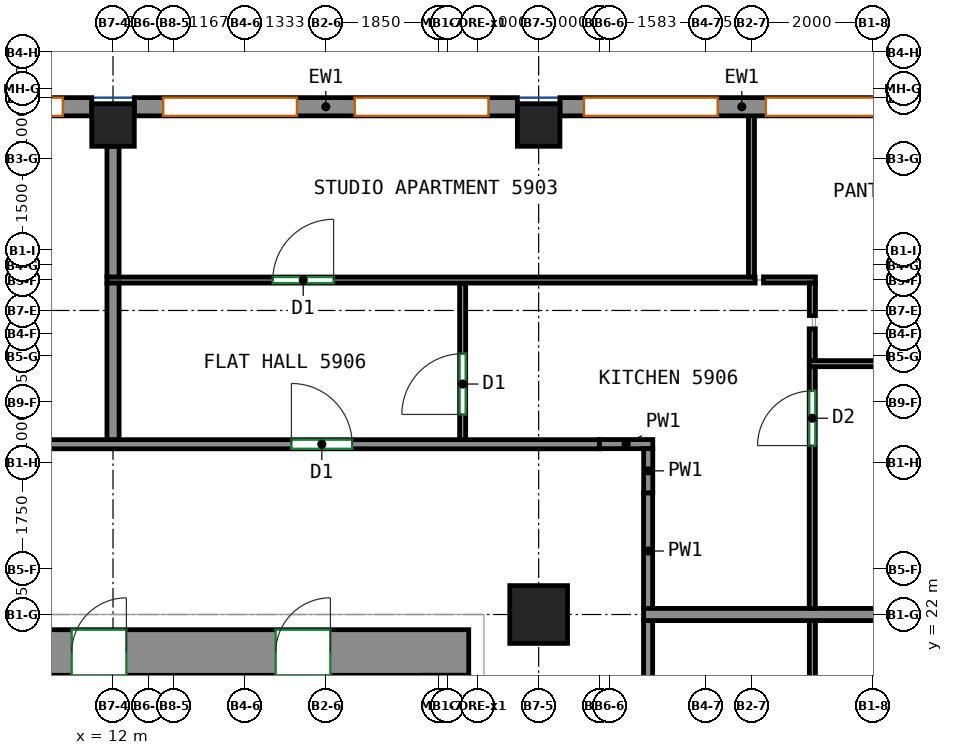
"""IFC4 building model, lengths in metres.
Left out: names, types, materials, properties, quantities, classifications, styles, units other than length and angle.
Written with IfcOpenShell. Run it as: python <this file> out.ifc"""

import sys

from ifc_helpers import new_model, si_unit, direction, frame, frame_2d, origin, origin_2d, place, context, subcontext, project, spatial, rectangle, extrude, source, transform, mapped, element, fill, save


model = new_model("IFC4")
c1 = context("Model", 3, precision=1e-05, world=origin(), true_north=direction((0.0, 1.0)))
c2 = subcontext(c1, "Body", "Model", "MODEL_VIEW")
j1 = project(units=[si_unit("LENGTHUNIT", "METRE"), si_unit("PLANEANGLEUNIT", "RADIAN")], contexts=[c1])
p1 = place(None, origin())
s1 = spatial("IfcSite", under=j1, at=p1, CompositionType="ELEMENT")
p2 = place(p1, origin())
s2 = spatial("IfcBuilding", under=s1, at=p2, CompositionType="ELEMENT")
p3 = place(p2, frame((0.0, 0.0, 245.8)))
s3 = spatial("IfcBuildingStorey", under=s2, at=p3, CompositionType="ELEMENT", Elevation=245.8)
m1 = source(origin(), c2, "Body", "SweptSolid", [
    extrude(rectangle(XDim=0.7, YDim=0.7, at=origin_2d()), origin(), (0.0, 0.0, 1.0), 3.12),
])
p4 = place(p3, frame((12.0, 30.05, 0.0), z_axis=(0.0, 0.0, 1.0), x_axis=(1.0, 0.0, 0.0)))
e1 = element("IfcColumn", 1, at=p4, inside=s3, PredefinedType="COLUMN", context=c2, shape_type="MappedRepresentation", body=[
    mapped(m1, transform((0.0, 0.0, 0.0))),
])
m2 = source(origin(), c2, "Body", "SweptSolid", [
    extrude(rectangle(XDim=0.95, YDim=0.95, at=origin_2d()), origin(), (0.0, 0.0, 1.0), 3.12),
])
p5 = place(p3, frame((19.0, 22.0, 0.0), z_axis=(0.0, 0.0, 1.0), x_axis=(1.0, 0.0, 0.0)))
e2 = element("IfcColumn", 2, at=p5, inside=s3, PredefinedType="COLUMN", context=c2, shape_type="MappedRepresentation", body=[
    mapped(m2, transform((0.0, 0.0, 0.0))),
])
p6 = place(p3, frame((19.0, 30.05, 0.0), z_axis=(0.0, 0.0, 1.0), x_axis=(1.0, 0.0, 0.0)))
e3 = element("IfcColumn", 3, at=p6, inside=s3, PredefinedType="COLUMN", context=c2, shape_type="MappedRepresentation", body=[
    mapped(m1, transform((0.0, 0.0, 0.0))),
])
m3 = source(origin(), c2, "Body", "SweptSolid", [
    extrude(rectangle(XDim=33.6, YDim=0.75, at=frame_2d((16.8, 0.0))), origin(), (0.0, 0.0, 1.0), 3.12),
])
p7 = place(p3, frame((-15.75, 21.375, 0.0), z_axis=(0.0, 0.0, 1.0), x_axis=(1.0, 0.0, 0.0)))
e4 = element("IfcWall", 4, at=p7, inside=s3, PredefinedType="SHEAR", context=c2, shape_type="MappedRepresentation", body=[
    mapped(m3, transform((0.0, 0.0, 0.0))),
])
p8 = place(p7, frame((5.858, 0.0, 0.0)))
e5 = element("IfcOpeningElement", 5, at=p8, cuts=e4, PredefinedType="OPENING", context=c2, shape_type="SweptSolid", body=[
    extrude(rectangle(XDim=0.9, YDim=2.1, at=frame_2d((0.45, 1.05))), frame((0.0, 0.385, 0.0), z_axis=(0.0, -1.0, 0.0), x_axis=(1.0, 0.0, 0.0)), (0.0, 0.0, 1.0), 0.77),
])
p9 = place(p7, frame((10.923, 0.0, 0.0)))
e6 = element("IfcOpeningElement", 6, at=p9, cuts=e4, PredefinedType="OPENING", context=c2, shape_type="SweptSolid", body=[
    extrude(rectangle(XDim=0.9, YDim=2.1, at=frame_2d((0.45, 1.05))), frame((0.0, 0.385, 0.0), z_axis=(0.0, -1.0, 0.0), x_axis=(1.0, 0.0, 0.0)), (0.0, 0.0, 1.0), 0.77),
])
p10 = place(p7, frame((15.988, 0.0, 0.0)))
e7 = element("IfcOpeningElement", 7, at=p10, cuts=e4, PredefinedType="OPENING", context=c2, shape_type="SweptSolid", body=[
    extrude(rectangle(XDim=0.9, YDim=2.1, at=frame_2d((0.45, 1.05))), frame((0.0, 0.385, 0.0), z_axis=(0.0, -1.0, 0.0), x_axis=(1.0, 0.0, 0.0)), (0.0, 0.0, 1.0), 0.77),
])
p11 = place(p7, frame((21.643, 0.0, 0.0)))
e8 = element("IfcOpeningElement", 8, at=p11, cuts=e4, PredefinedType="OPENING", context=c2, shape_type="SweptSolid", body=[
    extrude(rectangle(XDim=0.9, YDim=2.1, at=frame_2d((0.45, 1.05))), frame((0.0, 0.385, 0.0), z_axis=(0.0, -1.0, 0.0), x_axis=(1.0, 0.0, 0.0)), (0.0, 0.0, 1.0), 0.77),
])
p12 = place(p7, frame((27.07, 0.0, 0.0)))
e9 = element("IfcOpeningElement", 9, at=p12, cuts=e4, PredefinedType="OPENING", context=c2, shape_type="SweptSolid", body=[
    extrude(rectangle(XDim=0.9, YDim=2.1, at=frame_2d((0.45, 1.05))), frame((0.0, 0.385, 0.0), z_axis=(0.0, -1.0, 0.0), x_axis=(1.0, 0.0, 0.0)), (0.0, 0.0, 1.0), 0.77),
])
p13 = place(p7, frame((2.275, 0.0, 0.0)))
e10 = element("IfcOpeningElement", 10, at=p13, cuts=e4, PredefinedType="OPENING", context=c2, shape_type="SweptSolid", body=[
    extrude(rectangle(XDim=0.9, YDim=2.1, at=frame_2d((0.45, 1.05))), frame((0.0, 0.385, 0.0), z_axis=(0.0, -1.0, 0.0), x_axis=(1.0, 0.0, 0.0)), (0.0, 0.0, 1.0), 0.77),
])
p14 = place(p7, frame((30.425, 0.0, 0.0)))
e11 = element("IfcOpeningElement", 11, at=p14, cuts=e4, PredefinedType="OPENING", context=c2, shape_type="SweptSolid", body=[
    extrude(rectangle(XDim=0.9, YDim=2.1, at=frame_2d((0.45, 1.05))), frame((0.0, 0.385, 0.0), z_axis=(0.0, -1.0, 0.0), x_axis=(1.0, 0.0, 0.0)), (0.0, 0.0, 1.0), 0.77),
])
m4 = source(origin(), c2, "Body", "SweptSolid", [
    extrude(rectangle(XDim=5.982, YDim=0.3, at=frame_2d((2.991, 0.0))), origin(), (0.0, 0.0, 1.0), 3.12),
])
p15 = place(p3, frame((25.332, 30.35, 0.0), z_axis=(0.0, 0.0, 1.0), x_axis=(-1.0, 0.0, 0.0)))
e12 = element("IfcWall", 12, at=p15, inside=s3, PredefinedType="SOLIDWALL", context=c2, shape_type="MappedRepresentation", body=[
    mapped(m4, transform((0.0, 0.0, 0.0))),
])
p16 = place(p15, frame((0.396, 0.0, 0.8)))
e13 = element("IfcOpeningElement", 13, at=p16, cuts=e12, PredefinedType="OPENING", context=c2, shape_type="SweptSolid", body=[
    extrude(rectangle(XDim=2.2, YDim=2.05, at=frame_2d((1.1, 1.025))), frame((0.0, 0.16, 0.0), z_axis=(0.0, -1.0, 0.0), x_axis=(1.0, 0.0, 0.0)), (0.0, 0.0, 1.0), 0.32),
])
p17 = place(p15, frame((3.386, 0.0, 0.8)))
e14 = element("IfcOpeningElement", 14, at=p17, cuts=e12, PredefinedType="OPENING", context=c2, shape_type="SweptSolid", body=[
    extrude(rectangle(XDim=2.2, YDim=2.05, at=frame_2d((1.1, 1.025))), frame((0.0, 0.16, 0.0), z_axis=(0.0, -1.0, 0.0), x_axis=(1.0, 0.0, 0.0)), (0.0, 0.0, 1.0), 0.32),
])
m5 = source(origin(), c2, "Body", "SweptSolid", [
    extrude(rectangle(XDim=6.3, YDim=0.3, at=frame_2d((3.15, 0.0))), origin(), (0.0, 0.0, 1.0), 3.12),
])
p18 = place(p3, frame((18.65, 30.35, 0.0), z_axis=(0.0, 0.0, 1.0), x_axis=(-1.0, 0.0, 0.0)))
e15 = element("IfcWall", 15, at=p18, inside=s3, PredefinedType="SOLIDWALL", context=c2, shape_type="MappedRepresentation", body=[
    mapped(m5, transform((0.0, 0.0, 0.0))),
])
p19 = place(p18, frame((0.475, 0.0, 0.8)))
e16 = element("IfcOpeningElement", 16, at=p19, cuts=e15, PredefinedType="OPENING", context=c2, shape_type="SweptSolid", body=[
    extrude(rectangle(XDim=2.2, YDim=2.05, at=frame_2d((1.1, 1.025))), frame((0.0, 0.16, 0.0), z_axis=(0.0, -1.0, 0.0), x_axis=(1.0, 0.0, 0.0)), (0.0, 0.0, 1.0), 0.32),
])
p20 = place(p18, frame((3.625, 0.0, 0.8)))
e17 = element("IfcOpeningElement", 17, at=p20, cuts=e15, PredefinedType="OPENING", context=c2, shape_type="SweptSolid", body=[
    extrude(rectangle(XDim=2.2, YDim=2.05, at=frame_2d((1.1, 1.025))), frame((0.0, 0.16, 0.0), z_axis=(0.0, -1.0, 0.0), x_axis=(1.0, 0.0, 0.0)), (0.0, 0.0, 1.0), 0.32),
])
p21 = place(p3, frame((11.65, 30.35, 0.0), z_axis=(0.0, 0.0, 1.0), x_axis=(-1.0, 0.0, 0.0)))
e18 = element("IfcWall", 18, at=p21, inside=s3, PredefinedType="SOLIDWALL", context=c2, shape_type="MappedRepresentation", body=[
    mapped(m5, transform((0.0, 0.0, 0.0))),
])
p22 = place(p21, frame((0.475, 0.0, 0.8)))
e19 = element("IfcOpeningElement", 19, at=p22, cuts=e18, PredefinedType="OPENING", context=c2, shape_type="SweptSolid", body=[
    extrude(rectangle(XDim=2.2, YDim=2.05, at=frame_2d((1.1, 1.025))), frame((0.0, 0.16, 0.0), z_axis=(0.0, -1.0, 0.0), x_axis=(1.0, 0.0, 0.0)), (0.0, 0.0, 1.0), 0.32),
])
p23 = place(p21, frame((3.625, 0.0, 0.8)))
e20 = element("IfcOpeningElement", 20, at=p23, cuts=e18, PredefinedType="OPENING", context=c2, shape_type="SweptSolid", body=[
    extrude(rectangle(XDim=2.2, YDim=2.05, at=frame_2d((1.1, 1.025))), frame((0.0, 0.16, 0.0), z_axis=(0.0, -1.0, 0.0), x_axis=(1.0, 0.0, 0.0)), (0.0, 0.0, 1.0), 0.32),
])
p24 = place(p3, frame((20.8, 19.592, 0.0), z_axis=(0.0, 0.0, 1.0), x_axis=(0.0, 1.0, 0.0)))
e21 = element("IfcWall", 21, at=p24, inside=s3, PredefinedType="PARTITIONING", context=c2, shape_type="SweptSolid", body=[
    extrude(rectangle(XDim=2.318, YDim=0.15, at=frame_2d((1.159, 0.0))), origin(), (0.0, 0.0, 1.0), 3.12),
])
p25 = place(p3, frame((20.877, 24.802, 0.0), z_axis=(0.0, 0.0, 1.0), x_axis=(-1.0, 0.0, 0.0)))
e22 = element("IfcWall", 22, at=p25, inside=s3, PredefinedType="PARTITIONING", context=c2, shape_type="SweptSolid", body=[
    extrude(rectangle(XDim=0.879, YDim=0.15, at=frame_2d((0.439, 0.0))), origin(), (0.0, 0.0, 1.0), 3.12),
])
p26 = place(p3, frame((20.802, 23.998, 0.0), z_axis=(0.0, 0.0, 1.0), x_axis=(0.0, 1.0, 0.0)))
e23 = element("IfcWall", 23, at=p26, inside=s3, PredefinedType="PARTITIONING", context=c2, shape_type="SweptSolid", body=[
    extrude(rectangle(XDim=0.729, YDim=0.15, at=frame_2d((0.365, 0.0))), origin(), (0.0, 0.0, 1.0), 3.12),
])
p27 = place(p3, frame((20.8, 22.09, 0.0), z_axis=(0.0, 0.0, 1.0), x_axis=(0.0, 1.0, 0.0)))
e24 = element("IfcWall", 24, at=p27, inside=s3, PredefinedType="PARTITIONING", context=c2, shape_type="SweptSolid", body=[
    extrude(rectangle(XDim=1.908, YDim=0.15, at=frame_2d((0.954, 0.0))), origin(), (0.0, 0.0, 1.0), 3.12),
])
p28 = place(p3, frame((-16.075, 24.8, 0.0), z_axis=(0.0, 0.0, 1.0), x_axis=(1.0, 0.0, 0.0)))
e25 = element("IfcWall", 25, at=p28, inside=s3, PredefinedType="PARTITIONING", context=c2, shape_type="SweptSolid", body=[
    extrude(rectangle(XDim=36.073, YDim=0.15, at=frame_2d((18.037, 0.0))), origin(), (0.0, 0.0, 1.0), 3.12),
])
p29 = place(p28, frame((6.868, 0.0, 0.0)))
e26 = element("IfcOpeningElement", 26, at=p29, cuts=e25, PredefinedType="OPENING", context=c2, shape_type="SweptSolid", body=[
    extrude(rectangle(XDim=0.9, YDim=2.1, at=frame_2d((0.45, 1.05))), frame((0.0, 0.085, 0.0), z_axis=(0.0, -1.0, 0.0), x_axis=(1.0, 0.0, 0.0)), (0.0, 0.0, 1.0), 0.17),
])
p30 = place(p28, frame((31.009, 0.0, 0.0)))
e27 = element("IfcOpeningElement", 27, at=p30, cuts=e25, PredefinedType="OPENING", context=c2, shape_type="SweptSolid", body=[
    extrude(rectangle(XDim=1.0, YDim=2.1, at=frame_2d((0.5, 1.05))), frame((0.0, 0.085, 0.0), z_axis=(0.0, -1.0, 0.0), x_axis=(1.0, 0.0, 0.0)), (0.0, 0.0, 1.0), 0.17),
])
p31 = place(p3, frame((23.502, 19.592, 0.0), z_axis=(0.0, 0.0, 1.0), x_axis=(0.0, 1.0, 0.0)))
e28 = element("IfcWall", 28, at=p31, inside=s3, PredefinedType="PARTITIONING", context=c2, shape_type="SweptSolid", body=[
    extrude(rectangle(XDim=2.308, YDim=0.1, at=frame_2d((1.154, 0.0))), origin(), (0.0, 0.0, 1.0), 3.12),
])
p32 = place(p3, frame((20.727, 22.0, 0.0), z_axis=(0.0, 0.0, 1.0), x_axis=(1.0, 0.0, 0.0)))
e29 = element("IfcWall", 29, at=p32, inside=s3, PredefinedType="PARTITIONING", context=c2, shape_type="SweptSolid", body=[
    extrude(rectangle(XDim=7.973, YDim=0.2, at=frame_2d((3.986, 0.0))), origin(), (0.0, 0.0, 1.0), 2.57),
])
p33 = place(p3, frame((17.75, 24.877, 0.0), z_axis=(0.0, 0.0, 1.0), x_axis=(0.0, 1.0, 0.0)))
e30 = element("IfcWall", 30, at=p33, inside=s3, PredefinedType="PARTITIONING", context=c2, shape_type="SweptSolid", body=[
    extrude(rectangle(XDim=2.573, YDim=0.1, at=frame_2d((1.287, 0.0))), origin(), (0.0, 0.0, 1.0), 3.12),
])
p34 = place(p33, frame((0.413, 0.0, 0.0)))
e31 = element("IfcOpeningElement", 31, at=p34, cuts=e30, PredefinedType="OPENING", context=c2, shape_type="SweptSolid", body=[
    extrude(rectangle(XDim=1.0, YDim=2.1, at=frame_2d((0.5, 1.05))), frame((0.0, 0.06, 0.0), z_axis=(0.0, -1.0, 0.0), x_axis=(1.0, 0.0, 0.0)), (0.0, 0.0, 1.0), 0.12),
])
p35 = place(p3, frame((11.9, 27.5, 0.0), z_axis=(0.0, 0.0, 1.0), x_axis=(1.0, 0.0, 0.0)))
e32 = element("IfcWall", 32, at=p35, inside=s3, PredefinedType="PARTITIONING", context=c2, shape_type="SweptSolid", body=[
    extrude(rectangle(XDim=10.66, YDim=0.1, at=frame_2d((5.33, 0.0))), origin(), (0.0, 0.0, 1.0), 3.12),
])
p36 = place(p35, frame((2.728, 0.0, 0.0)))
e33 = element("IfcOpeningElement", 33, at=p36, cuts=e32, PredefinedType="OPENING", context=c2, shape_type="SweptSolid", body=[
    extrude(rectangle(XDim=1.0, YDim=2.1, at=frame_2d((0.5, 1.05))), frame((0.0, 0.06, 0.0), z_axis=(0.0, -1.0, 0.0), x_axis=(1.0, 0.0, 0.0)), (0.0, 0.0, 1.0), 0.12),
])
p37 = place(p3, frame((12.0, 24.877, 0.0), z_axis=(0.0, 0.0, 1.0), x_axis=(0.0, 1.0, 0.0)))
e34 = element("IfcWall", 34, at=p37, inside=s3, PredefinedType="PARTITIONING", context=c2, shape_type="SweptSolid", body=[
    extrude(rectangle(XDim=2.573, YDim=0.2, at=frame_2d((1.287, 0.0))), origin(), (0.0, 0.0, 1.0), 3.12),
])
p38 = place(p3, frame((23.5, 22.1, 0.0), z_axis=(0.0, 0.0, 1.0), x_axis=(0.0, 1.0, 0.0)))
e35 = element("IfcWall", 35, at=p38, inside=s3, PredefinedType="PARTITIONING", context=c2, shape_type="SweptSolid", body=[
    extrude(rectangle(XDim=3.985, YDim=0.1, at=frame_2d((1.992, 0.0))), origin(), (0.0, 0.0, 1.0), 3.12),
])
p39 = place(p38, frame((2.678, 0.0, 0.0)))
e36 = element("IfcOpeningElement", 36, at=p39, cuts=e35, PredefinedType="OPENING", context=c2, shape_type="SweptSolid", body=[
    extrude(rectangle(XDim=0.9, YDim=2.1, at=frame_2d((0.45, 1.05))), frame((0.0, 0.06, 0.0), z_axis=(0.0, -1.0, 0.0), x_axis=(1.0, 0.0, 0.0)), (0.0, 0.0, 1.0), 0.12),
])
p40 = place(p3, frame((23.552, 27.502, 0.0), z_axis=(0.0, 0.0, 1.0), x_axis=(-1.0, 0.0, 0.0)))
e37 = element("IfcWall", 37, at=p40, inside=s3, PredefinedType="PARTITIONING", context=c2, shape_type="SweptSolid", body=[
    extrude(rectangle(XDim=0.854, YDim=0.1, at=frame_2d((0.427, 0.0))), origin(), (0.0, 0.0, 1.0), 3.12),
])
p41 = place(p3, frame((23.502, 26.917, 0.0), z_axis=(0.0, 0.0, 1.0), x_axis=(0.0, 1.0, 0.0)))
e38 = element("IfcWall", 38, at=p41, inside=s3, PredefinedType="PARTITIONING", context=c2, shape_type="SweptSolid", body=[
    extrude(rectangle(XDim=0.535, YDim=0.1, at=frame_2d((0.268, 0.0))), origin(), (0.0, 0.0, 1.0), 3.12),
])
p42 = place(p3, frame((23.5, 26.165, 0.0), z_axis=(0.0, 0.0, 1.0), x_axis=(0.0, 1.0, 0.0)))
e39 = element("IfcWall", 39, at=p42, inside=s3, PredefinedType="PARTITIONING", context=c2, shape_type="SweptSolid", body=[
    extrude(rectangle(XDim=0.533, YDim=0.1, at=frame_2d((0.267, 0.0))), origin(), (0.0, 0.0, 1.0), 3.12),
])
p43 = place(p3, frame((22.5, 27.552, 0.0), z_axis=(0.0, 0.0, 1.0), x_axis=(0.0, 1.0, 0.0)))
e40 = element("IfcWall", 40, at=p43, inside=s3, PredefinedType="PARTITIONING", context=c2, shape_type="SweptSolid", body=[
    extrude(rectangle(XDim=2.698, YDim=0.1, at=frame_2d((1.349, 0.0))), origin(), (0.0, 0.0, 1.0), 3.12),
])
p44 = place(p3, frame((12.0, 27.552, 0.0), z_axis=(0.0, 0.0, 1.0), x_axis=(0.0, 1.0, 0.0)))
e41 = element("IfcWall", 41, at=p44, inside=s3, PredefinedType="PARTITIONING", context=c2, shape_type="SweptSolid", body=[
    extrude(rectangle(XDim=2.148, YDim=0.2, at=frame_2d((1.074, 0.0))), origin(), (0.0, 0.0, 1.0), 3.12),
])
p45 = place(p3, frame((29.25, 26.125, 0.0), z_axis=(0.0, 0.0, 1.0), x_axis=(-1.0, 0.0, 0.0)))
e42 = element("IfcWall", 42, at=p45, inside=s3, PredefinedType="PARTITIONING", context=c2, shape_type="SweptSolid", body=[
    extrude(rectangle(XDim=5.798, YDim=0.1, at=frame_2d((2.899, 0.0))), origin(), (0.0, 0.0, 1.0), 3.12),
])
p46 = place(p45, frame((3.676, 0.0, 0.0)))
e43 = element("IfcOpeningElement", 43, at=p46, cuts=e42, PredefinedType="OPENING", context=c2, shape_type="SweptSolid", body=[
    extrude(rectangle(XDim=0.9, YDim=2.1, at=frame_2d((0.45, 1.05))), frame((0.0, 0.06, 0.0), z_axis=(0.0, -1.0, 0.0), x_axis=(1.0, 0.0, 0.0)), (0.0, 0.0, 1.0), 0.12),
])
p47 = place(p16, origin())
e44 = element("IfcWindow", 44, at=p47, inside=s3, PartitioningType="SINGLE_PANEL", PredefinedType="WINDOW", context=c2, shape_type="SweptSolid", body=[
    extrude(rectangle(XDim=2.2, YDim=2.05, at=frame_2d((1.1, 1.025))), frame((0.0, 0.03, 0.0), z_axis=(0.0, -1.0, 0.0), x_axis=(1.0, 0.0, 0.0)), (0.0, 0.0, 1.0), 0.06),
])
fill(e13, e44)
p48 = place(p17, origin())
e45 = element("IfcWindow", 45, at=p48, inside=s3, PartitioningType="SINGLE_PANEL", PredefinedType="WINDOW", context=c2, shape_type="SweptSolid", body=[
    extrude(rectangle(XDim=2.2, YDim=2.05, at=frame_2d((1.1, 1.025))), frame((0.0, 0.03, 0.0), z_axis=(0.0, -1.0, 0.0), x_axis=(1.0, 0.0, 0.0)), (0.0, 0.0, 1.0), 0.06),
])
fill(e14, e45)
p49 = place(p19, origin())
e46 = element("IfcWindow", 46, at=p49, inside=s3, PartitioningType="SINGLE_PANEL", PredefinedType="WINDOW", context=c2, shape_type="SweptSolid", body=[
    extrude(rectangle(XDim=2.2, YDim=2.05, at=frame_2d((1.1, 1.025))), frame((0.0, 0.03, 0.0), z_axis=(0.0, -1.0, 0.0), x_axis=(1.0, 0.0, 0.0)), (0.0, 0.0, 1.0), 0.06),
])
fill(e16, e46)
p50 = place(p20, origin())
e47 = element("IfcWindow", 47, at=p50, inside=s3, PartitioningType="SINGLE_PANEL", PredefinedType="WINDOW", context=c2, shape_type="SweptSolid", body=[
    extrude(rectangle(XDim=2.2, YDim=2.05, at=frame_2d((1.1, 1.025))), frame((0.0, 0.03, 0.0), z_axis=(0.0, -1.0, 0.0), x_axis=(1.0, 0.0, 0.0)), (0.0, 0.0, 1.0), 0.06),
])
fill(e17, e47)
p51 = place(p22, origin())
e48 = element("IfcWindow", 48, at=p51, inside=s3, PartitioningType="SINGLE_PANEL", PredefinedType="WINDOW", context=c2, shape_type="SweptSolid", body=[
    extrude(rectangle(XDim=2.2, YDim=2.05, at=frame_2d((1.1, 1.025))), frame((0.0, 0.03, 0.0), z_axis=(0.0, -1.0, 0.0), x_axis=(1.0, 0.0, 0.0)), (0.0, 0.0, 1.0), 0.06),
])
fill(e19, e48)
p52 = place(p12, origin())
e49 = element("IfcDoor", 49, at=p52, inside=s3, OperationType="SINGLE_SWING_RIGHT", PredefinedType="DOOR", context=c2, shape_type="SweptSolid", body=[
    extrude(rectangle(XDim=0.9, YDim=2.1, at=frame_2d((0.45, 1.05))), frame((0.0, -0.23, 0.0), z_axis=(0.0, -1.0, 0.0), x_axis=(1.0, 0.0, 0.0)), (0.0, 0.0, 1.0), 0.05),
])
fill(e9, e49)
p53 = place(p14, origin())
e50 = element("IfcDoor", 50, at=p53, inside=s3, OperationType="SINGLE_SWING_RIGHT", PredefinedType="DOOR", context=c2, shape_type="SweptSolid", body=[
    extrude(rectangle(XDim=0.9, YDim=2.1, at=frame_2d((0.45, 1.05))), frame((0.0, -0.23, 0.0), z_axis=(0.0, -1.0, 0.0), x_axis=(1.0, 0.0, 0.0)), (0.0, 0.0, 1.0), 0.05),
])
fill(e11, e50)
p54 = place(p30, origin())
e51 = element("IfcDoor", 51, at=p54, inside=s3, OperationType="SINGLE_SWING_LEFT", PredefinedType="DOOR", context=c2, shape_type="SweptSolid", body=[
    extrude(rectangle(XDim=1.0, YDim=2.1, at=frame_2d((0.5, 1.05))), frame((0.0, 0.025, 0.0), z_axis=(0.0, -1.0, 0.0), x_axis=(1.0, 0.0, 0.0)), (0.0, 0.0, 1.0), 0.05),
])
fill(e27, e51)
p55 = place(p39, origin())
e52 = element("IfcDoor", 52, at=p55, inside=s3, OperationType="SINGLE_SWING_LEFT", PredefinedType="DOOR", context=c2, shape_type="SweptSolid", body=[
    extrude(rectangle(XDim=0.9, YDim=2.1, at=frame_2d((0.45, 1.05))), frame((0.0, 0.025, 0.0), z_axis=(0.0, -1.0, 0.0), x_axis=(1.0, 0.0, 0.0)), (0.0, 0.0, 1.0), 0.05),
])
fill(e36, e52)
p56 = place(p34, origin())
e53 = element("IfcDoor", 53, at=p56, inside=s3, OperationType="SINGLE_SWING_LEFT", PredefinedType="DOOR", context=c2, shape_type="SweptSolid", body=[
    extrude(rectangle(XDim=1.0, YDim=2.1, at=frame_2d((0.5, 1.05))), frame((0.0, 0.025, 0.0), z_axis=(0.0, -1.0, 0.0), x_axis=(1.0, 0.0, 0.0)), (0.0, 0.0, 1.0), 0.05),
])
fill(e31, e53)
p57 = place(p36, origin())
e54 = element("IfcDoor", 54, at=p57, inside=s3, OperationType="SINGLE_SWING_RIGHT", PredefinedType="DOOR", context=c2, shape_type="SweptSolid", body=[
    extrude(rectangle(XDim=1.0, YDim=2.1, at=frame_2d((0.5, 1.05))), frame((0.0, 0.025, 0.0), z_axis=(0.0, -1.0, 0.0), x_axis=(1.0, 0.0, 0.0)), (0.0, 0.0, 1.0), 0.05),
])
fill(e33, e54)
save(model, sys.argv[1])
